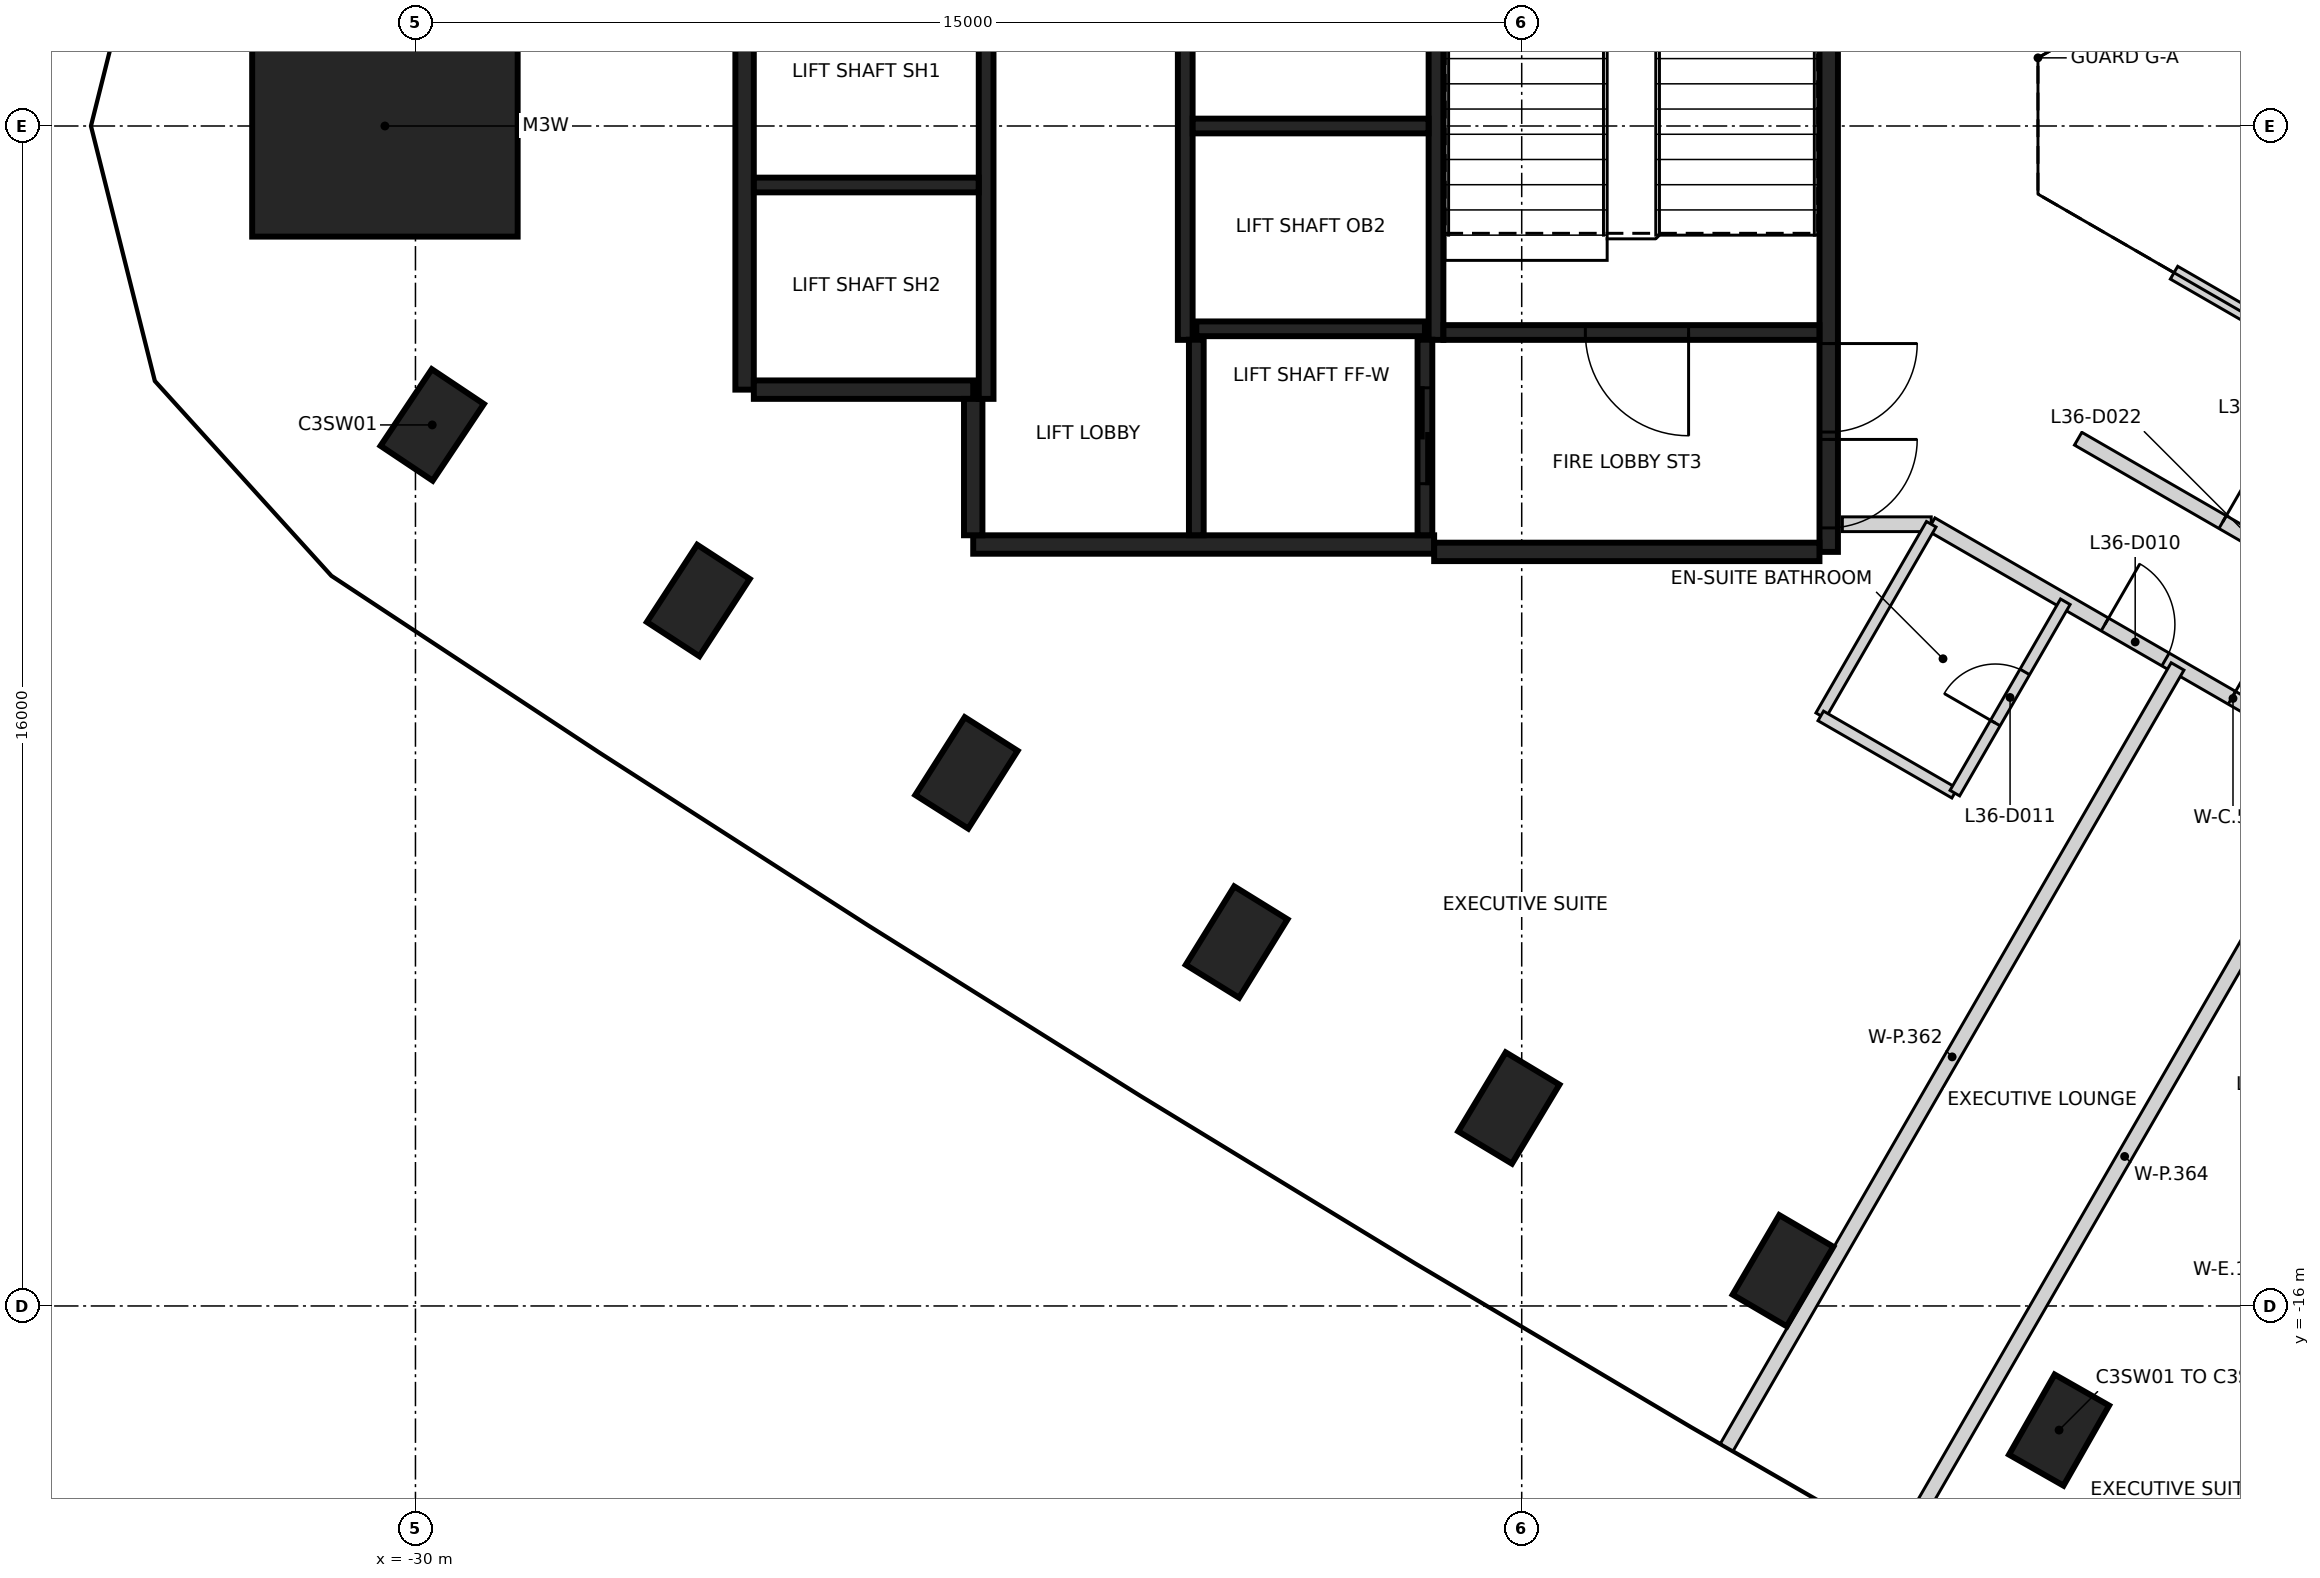
"""IFC4 building model, lengths in metres.
Left out: names, types, materials, properties, quantities, classifications, styles, units other than length and angle.
Written with IfcOpenShell. Run it as: python <this file> out.ifc"""

import sys

from ifc_helpers import new_model, si_unit, direction, frame, frame_2d, origin, origin_2d, place, context, subcontext, project, spatial, rectangle, extrude, element, fill, save


model = new_model("IFC4")
c1 = context("Model", 3, precision=1e-05, world=origin(), true_north=direction((0.0, 1.0)))
c2 = subcontext(c1, "Body", "Model", "MODEL_VIEW")
j1 = project(units=[si_unit("LENGTHUNIT", "METRE"), si_unit("PLANEANGLEUNIT", "RADIAN")], contexts=[c1])
p1 = place(None, origin())
s1 = spatial("IfcSite", under=j1, at=p1, CompositionType="ELEMENT")
p2 = place(p1, origin())
s2 = spatial("IfcBuilding", under=s1, at=p2, CompositionType="ELEMENT")
p3 = place(p2, frame((0.0, 0.0, 146.8)))
s3 = spatial("IfcBuildingStorey", under=s2, at=p3, CompositionType="ELEMENT", Elevation=146.8)
for number, where, z_axis, x_axis in (
    (1, (-29.773, -4.053, -0.4), (0.0, 0.0, 1.0), (0.556, 0.831, 0.0)),
    (2, (-26.165, -6.434, -0.4), (0.0, 0.0, 1.0), (0.546, 0.838, 0.0)),
    (3, (-22.529, -8.772, -0.4), (0.0, 0.0, 1.0), (0.536, 0.844, 0.0)),
    (4, (-18.865, -11.066, -0.4), (0.0, 0.0, 1.0), (0.526, 0.851, 0.0)),
    (5, (-15.175, -13.316, -0.4), (0.0, 0.0, 1.0), (0.515, 0.857, 0.0)),
    (6, (-11.457, -15.522, -0.4), (0.0, 0.0, 1.0), (0.505, 0.863, 0.0)),
    (7, (-7.714, -17.683, -0.4), (0.0, 0.0, 1.0), (0.495, 0.869, 0.0)),
):
    element("IfcColumn", number, at=place(p3, frame(where, z_axis=z_axis, x_axis=x_axis)), inside=s3, PredefinedType="COLUMN", context=c2, shape_type="SweptSolid", body=[
        extrude(rectangle(XDim=1.25, YDim=0.85, at=origin_2d()), origin(), (0.0, 0.0, 1.0), 3.6),
    ])
p4 = place(p3, frame((-30.414, 0.0, -0.4), z_axis=(0.0, 0.0, 1.0), x_axis=(1.0, 0.0, 0.0)))
e8 = element("IfcColumn", 8, at=p4, inside=s3, PredefinedType="COLUMN", context=c2, shape_type="SweptSolid", body=[
    extrude(rectangle(XDim=3.6, YDim=3.0, at=origin_2d()), origin(), (0.0, 0.0, 1.0), 3.6),
])
p5 = place(p3, frame((-10.837, 5.775, 0.0), z_axis=(0.0, 0.0, 1.0), x_axis=(0.0, -1.0, 0.0)))
e9 = element("IfcWall", 9, at=p5, inside=s3, PredefinedType="SHEAR", context=c2, shape_type="SweptSolid", body=[
    extrude(rectangle(XDim=11.55, YDim=0.25, at=frame_2d((5.775, 0.0))), origin(), (0.0, 0.0, 1.0), 3.2),
])
p6 = place(p5, frame((10.025, 0.0, 0.0)))
e10 = element("IfcOpeningElement", 10, at=p6, cuts=e9, PredefinedType="OPENING", context=c2, shape_type="SweptSolid", body=[
    extrude(rectangle(XDim=1.2, YDim=2.1, at=frame_2d((0.6, 1.05))), frame((0.0, 0.135, 0.0), z_axis=(0.0, -1.0, 0.0), x_axis=(1.0, 0.0, 0.0)), (0.0, 0.0, 1.0), 0.27),
])
p7 = place(p5, frame((8.725, 0.0, 0.0)))
e11 = element("IfcOpeningElement", 11, at=p7, cuts=e9, PredefinedType="OPENING", context=c2, shape_type="SweptSolid", body=[
    extrude(rectangle(XDim=1.2, YDim=2.1, at=frame_2d((0.6, 1.05))), frame((0.0, 0.135, 0.0), z_axis=(0.0, -1.0, 0.0), x_axis=(1.0, 0.0, 0.0)), (0.0, 0.0, 1.0), 0.27),
])
p8 = place(p3, frame((-16.187, -5.675, 0.0), z_axis=(0.0, 0.0, 1.0), x_axis=(-1.0, 0.0, 0.0)))
e12 = element("IfcWall", 12, at=p8, inside=s3, PredefinedType="SHEAR", context=c2, shape_type="SweptSolid", body=[
    extrude(rectangle(XDim=6.25, YDim=0.25, at=frame_2d((3.125, 0.0))), origin(), (0.0, 0.0, 1.0), 3.2),
])
p9 = place(p3, frame((-25.537, -3.575, 0.0), z_axis=(0.0, 0.0, 1.0), x_axis=(0.0, 1.0, 0.0)))
e13 = element("IfcWall", 13, at=p9, inside=s3, PredefinedType="SHEAR", context=c2, shape_type="SweptSolid", body=[
    extrude(rectangle(XDim=5.85, YDim=0.25, at=frame_2d((2.925, 0.0))), origin(), (0.0, 0.0, 1.0), 3.2),
])
p10 = place(p3, frame((-10.963, -5.775, 0.0), z_axis=(0.0, 0.0, 1.0), x_axis=(-1.0, 0.0, 0.0)))
e14 = element("IfcWall", 14, at=p10, inside=s3, PredefinedType="SHEAR", context=c2, shape_type="SweptSolid", body=[
    extrude(rectangle(XDim=5.225, YDim=0.25, at=frame_2d((2.612, 0.0))), origin(), (0.0, 0.0, 1.0), 3.2),
])
p11 = place(p3, frame((-22.437, -3.575, 0.0), z_axis=(0.0, 0.0, 1.0), x_axis=(-1.0, 0.0, 0.0)))
e15 = element("IfcWall", 15, at=p11, inside=s3, PredefinedType="SHEAR", context=c2, shape_type="SweptSolid", body=[
    extrude(rectangle(XDim=2.975, YDim=0.25, at=frame_2d((1.487, 0.0))), origin(), (0.0, 0.0, 1.0), 3.2),
])
p12 = place(p3, frame((-22.437, -5.55, 0.0), z_axis=(0.0, 0.0, 1.0), x_axis=(0.0, 1.0, 0.0)))
e16 = element("IfcWall", 16, at=p12, inside=s3, PredefinedType="SHEAR", context=c2, shape_type="SweptSolid", body=[
    extrude(rectangle(XDim=1.849, YDim=0.25, at=frame_2d((0.925, 0.0))), origin(), (0.0, 0.0, 1.0), 3.2),
])
p13 = place(p3, frame((-16.162, 2.951, 0.0), z_axis=(0.0, 0.0, 1.0), x_axis=(0.0, -1.0, 0.0)))
e17 = element("IfcWall", 17, at=p13, inside=s3, PredefinedType="SHEAR", context=c2, shape_type="SweptSolid", body=[
    extrude(rectangle(XDim=5.851, YDim=0.2, at=frame_2d((2.925, 0.0))), origin(), (0.0, 0.0, 1.0), 3.2),
])
for number, where, z_axis, x_axis in (
    (18, (-19.562, -2.9, 0.0), (0.0, 0.0, 1.0), (0.0, 1.0, 0.0)),
    (19, (-22.262, 2.4, 0.0), (0.0, 0.0, 1.0), (0.0, -1.0, 0.0)),
):
    element("IfcWall", number, at=place(p3, frame(where, z_axis=z_axis, x_axis=x_axis)), inside=s3, PredefinedType="SHEAR", context=c2, shape_type="SweptSolid", body=[
        extrude(rectangle(XDim=6.1, YDim=0.2, at=frame_2d((3.05, 0.0))), origin(), (0.0, 0.0, 1.0), 3.2),
    ])
p14 = place(p3, frame((-10.963, -2.8, 0.0), z_axis=(0.0, 0.0, 1.0), x_axis=(-1.0, 0.0, 0.0)))
e20 = element("IfcWall", 20, at=p14, inside=s3, PredefinedType="SHEAR", context=c2, shape_type="SweptSolid", body=[
    extrude(rectangle(XDim=5.098, YDim=0.2, at=frame_2d((2.549, 0.0))), origin(), (0.0, 0.0, 1.0), 3.2),
])
p15 = place(p14, frame((1.774, 0.0, 0.0)))
e21 = element("IfcOpeningElement", 21, at=p15, cuts=e20, PredefinedType="OPENING", context=c2, shape_type="SweptSolid", body=[
    extrude(rectangle(XDim=1.4, YDim=2.1, at=frame_2d((0.7, 1.05))), frame((0.0, 0.11, 0.0), z_axis=(0.0, -1.0, 0.0), x_axis=(1.0, 0.0, 0.0)), (0.0, 0.0, 1.0), 0.22),
])
p16 = place(p3, frame((-16.263, 0.0, 0.0), z_axis=(0.0, 0.0, 1.0), x_axis=(-1.0, 0.0, 0.0)))
e22 = element("IfcWall", 22, at=p16, inside=s3, PredefinedType="SHEAR", context=c2, shape_type="SweptSolid", body=[
    extrude(rectangle(XDim=3.198, YDim=0.2, at=frame_2d((1.599, 0.0))), origin(), (0.0, 0.0, 1.0), 3.2),
])
p17 = place(p3, frame((-22.363, -0.8, 0.0), z_axis=(0.0, 0.0, 1.0), x_axis=(-1.0, 0.0, 0.0)))
e23 = element("IfcWall", 23, at=p17, inside=s3, PredefinedType="SHEAR", context=c2, shape_type="SweptSolid", body=[
    extrude(rectangle(XDim=3.048, YDim=0.2, at=frame_2d((1.524, 0.0))), origin(), (0.0, 0.0, 1.0), 3.2),
])
p18 = place(p3, frame((-19.412, -2.75, 0.0), z_axis=(0.0, 0.0, 1.0), x_axis=(1.0, 0.0, 0.0)))
e24 = element("IfcWall", 24, at=p18, inside=s3, PredefinedType="SHEAR", context=c2, shape_type="SweptSolid", body=[
    extrude(rectangle(XDim=3.1, YDim=0.2, at=frame_2d((1.55, 0.0))), origin(), (0.0, 0.0, 1.0), 3.2),
])
p19 = place(p3, frame((-16.312, -2.898, 0.0), z_axis=(0.0, 0.0, 1.0), x_axis=(0.0, -1.0, 0.0)))
e25 = element("IfcWall", 25, at=p19, inside=s3, PredefinedType="SHEAR", context=c2, shape_type="SweptSolid", body=[
    extrude(rectangle(XDim=2.651, YDim=0.2, at=frame_2d((1.325, 0.0))), origin(), (0.0, 0.0, 1.0), 3.2),
])
p20 = place(p19, frame((0.652, 0.0, 0.0)))
e26 = element("IfcOpeningElement", 26, at=p20, cuts=e25, PredefinedType="OPENING", context=c2, shape_type="SweptSolid", body=[
    extrude(rectangle(XDim=1.3, YDim=2.1, at=frame_2d((0.65, 1.05))), frame((0.0, 0.11, 0.0), z_axis=(0.0, -1.0, 0.0), x_axis=(1.0, 0.0, 0.0)), (0.0, 0.0, 1.0), 0.22),
])
p21 = place(p3, frame((-19.412, -5.549, 0.0), z_axis=(0.0, 0.0, 1.0), x_axis=(0.0, 1.0, 0.0)))
e27 = element("IfcWall", 27, at=p21, inside=s3, PredefinedType="SHEAR", context=c2, shape_type="SweptSolid", body=[
    extrude(rectangle(XDim=2.651, YDim=0.2, at=frame_2d((1.325, 0.0))), origin(), (0.0, 0.0, 1.0), 3.2),
])
p22 = place(p3, frame((-10.652, -5.4, 0.0), z_axis=(0.0, 0.0, 1.0), x_axis=(1.0, 0.0, 0.0)))
e28 = element("IfcWall", 28, at=p22, inside=s3, PredefinedType="PARTITIONING", context=c2, shape_type="SweptSolid", body=[
    extrude(rectangle(XDim=1.205, YDim=0.2, at=frame_2d((0.603, 0.0))), origin(), (0.0, 0.0, 1.0), 3.2),
])
p23 = place(p3, frame((-9.447, -5.4, 0.0), z_axis=(0.0, 0.0, 1.0), x_axis=(0.866101262146, -0.49986858644, 0.0)))
e29 = element("IfcWall", 29, at=p23, inside=s3, PredefinedType="PARTITIONING", context=c2, shape_type="SweptSolid", body=[
    extrude(rectangle(XDim=9.449, YDim=0.2, at=frame_2d((4.724, 0.0))), origin(), (0.0, 0.0, 1.0), 3.2),
])
p24 = place(p23, frame((2.718, 0.0, 0.0)))
e30 = element("IfcOpeningElement", 30, at=p24, cuts=e29, PredefinedType="OPENING", context=c2, shape_type="SweptSolid", body=[
    extrude(rectangle(XDim=0.95, YDim=2.1, at=frame_2d((0.475, 1.05))), frame((0.0, 0.11, 0.0), z_axis=(0.0, -1.0, 0.0), x_axis=(1.0, 0.0, 0.0)), (0.0, 0.0, 1.0), 0.22),
])
p25 = place(p23, frame((4.707, 0.0, 0.0)))
e31 = element("IfcOpeningElement", 31, at=p25, cuts=e29, PredefinedType="OPENING", context=c2, shape_type="SweptSolid", body=[
    extrude(rectangle(XDim=1.0, YDim=2.1, at=frame_2d((0.5, 1.05))), frame((0.0, 0.11, 0.0), z_axis=(0.0, -1.0, 0.0), x_axis=(1.0, 0.0, 0.0)), (0.0, 0.0, 1.0), 0.22),
])
p26 = place(p23, frame((6.746, 0.0, 0.0)))
e32 = element("IfcOpeningElement", 32, at=p26, cuts=e29, PredefinedType="OPENING", context=c2, shape_type="SweptSolid", body=[
    extrude(rectangle(XDim=0.95, YDim=2.1, at=frame_2d((0.475, 1.05))), frame((0.0, 0.11, 0.0), z_axis=(0.0, -1.0, 0.0), x_axis=(1.0, 0.0, 0.0)), (0.0, 0.0, 1.0), 0.22),
])
p27 = place(p3, frame((-7.455, -4.24, 0.0), z_axis=(0.0, 0.0, 1.0), x_axis=(0.866015783746, -0.500016662025, 0.0)))
e33 = element("IfcWall", 33, at=p27, inside=s3, PredefinedType="PARTITIONING", context=c2, shape_type="SweptSolid", body=[
    extrude(rectangle(XDim=10.009, YDim=0.2, at=frame_2d((5.004, 0.0))), origin(), (0.0, 0.0, 1.0), 3.2),
])
p28 = place(p27, frame((2.262, 0.0, 0.0)))
e34 = element("IfcOpeningElement", 34, at=p28, cuts=e33, PredefinedType="OPENING", context=c2, shape_type="SweptSolid", body=[
    extrude(rectangle(XDim=0.9, YDim=2.1, at=frame_2d((0.45, 1.05))), frame((0.0, 0.11, 0.0), z_axis=(0.0, -1.0, 0.0), x_axis=(1.0, 0.0, 0.0)), (0.0, 0.0, 1.0), 0.22),
])
p29 = place(p27, frame((7.254, 0.0, 0.0)))
e35 = element("IfcOpeningElement", 35, at=p29, cuts=e33, PredefinedType="OPENING", context=c2, shape_type="SweptSolid", body=[
    extrude(rectangle(XDim=0.9, YDim=2.1, at=frame_2d((0.45, 1.05))), frame((0.0, 0.11, 0.0), z_axis=(0.0, -1.0, 0.0), x_axis=(1.0, 0.0, 0.0)), (0.0, 0.0, 1.0), 0.22),
])
p30 = place(p3, frame((-12.22, -17.917, 0.0), z_axis=(0.0, 0.0, 1.0), x_axis=(0.499963860175, 0.866046268117, 0.0)))
e36 = element("IfcWall", 36, at=p30, inside=s3, PredefinedType="PARTITIONING", context=c2, shape_type="SweptSolid", body=[
    extrude(rectangle(XDim=12.227, YDim=0.2, at=frame_2d((6.114, 0.0))), origin(), (0.0, 0.0, 1.0), 2.3),
])
p31 = place(p3, frame((-9.882, -19.267, 0.0), z_axis=(0.0, 0.0, 1.0), x_axis=(0.499993811829, 0.866028976497, 0.0)))
e37 = element("IfcWall", 37, at=p31, inside=s3, PredefinedType="PARTITIONING", context=c2, shape_type="SweptSolid", body=[
    extrude(rectangle(XDim=12.227, YDim=0.2, at=frame_2d((6.114, 0.0))), origin(), (0.0, 0.0, 1.0), 2.3),
])
p32 = place(p3, frame((-6.155, -1.989, 0.0), z_axis=(0.0, 0.0, 1.0), x_axis=(0.866009062299, -0.500028303215, 0.0)))
e38 = element("IfcWall", 38, at=p32, inside=s3, PredefinedType="PARTITIONING", context=c2, shape_type="SweptSolid", body=[
    extrude(rectangle(XDim=10.802, YDim=0.2, at=frame_2d((5.401, 0.0))), origin(), (0.0, 0.0, 1.0), 2.3),
])
p33 = place(p3, frame((-5.173, -21.926, 0.0), z_axis=(0.0, 0.0, 1.0), x_axis=(0.499941227542, 0.86605933342, 0.0)))
e39 = element("IfcWall", 39, at=p33, inside=s3, PredefinedType="PARTITIONING", context=c2, shape_type="SweptSolid", body=[
    extrude(rectangle(XDim=5.249, YDim=0.2, at=frame_2d((2.625, 0.0))), origin(), (0.0, 0.0, 1.0), 3.2),
])
p34 = place(p3, frame((-10.946, -7.996, 0.0), z_axis=(0.0, 0.0, 1.0), x_axis=(0.500027927039, 0.866009279501, 0.0)))
e40 = element("IfcWall", 40, at=p34, inside=s3, PredefinedType="PARTITIONING", context=c2, shape_type="SweptSolid", body=[
    extrude(rectangle(XDim=2.998, YDim=0.15, at=frame_2d((1.499, 0.0))), origin(), (0.0, 0.0, 1.0), 3.2),
])
p35 = place(p3, frame((-10.945, -7.999, 0.0), z_axis=(0.0, 0.0, 1.0), x_axis=(0.866005190944, -0.500035008033, 0.0)))
e41 = element("IfcWall", 41, at=p35, inside=s3, PredefinedType="PARTITIONING", context=c2, shape_type="SweptSolid", body=[
    extrude(rectangle(XDim=2.096, YDim=0.15, at=frame_2d((1.048, 0.0))), origin(), (0.0, 0.0, 1.0), 3.2),
])
p36 = place(p3, frame((-9.127, -9.046, 0.0), z_axis=(0.0, 0.0, 1.0), x_axis=(0.499959910729, 0.866048548099, 0.0)))
e42 = element("IfcWall", 42, at=p36, inside=s3, PredefinedType="PARTITIONING", context=c2, shape_type="SweptSolid", body=[
    extrude(rectangle(XDim=2.996, YDim=0.15, at=frame_2d((1.498, 0.0))), origin(), (0.0, 0.0, 1.0), 3.2),
])
p37 = place(p36, frame((1.098, 0.0, 0.0)))
e43 = element("IfcOpeningElement", 43, at=p37, cuts=e42, PredefinedType="OPENING", context=c2, shape_type="SweptSolid", body=[
    extrude(rectangle(XDim=0.8, YDim=2.1, at=frame_2d((0.4, 1.05))), frame((0.0, 0.085, 0.0), z_axis=(0.0, -1.0, 0.0), x_axis=(1.0, 0.0, 0.0)), (0.0, 0.0, 1.0), 0.17),
])
p38 = place(p20, origin())
e44 = element("IfcDoor", 44, at=p38, inside=s3, OperationType="SLIDING_TO_RIGHT", PredefinedType="DOOR", context=c2, shape_type="SweptSolid", body=[
    extrude(rectangle(XDim=1.3, YDim=2.1, at=frame_2d((0.65, 1.05))), frame((0.0, 0.025, 0.0), z_axis=(0.0, -1.0, 0.0), x_axis=(1.0, 0.0, 0.0)), (0.0, 0.0, 1.0), 0.05),
])
fill(e26, e44)
p39 = place(p6, origin())
e45 = element("IfcDoor", 45, at=p39, inside=s3, OperationType="SINGLE_SWING_LEFT", PredefinedType="DOOR", context=c2, shape_type="SweptSolid", body=[
    extrude(rectangle(XDim=1.2, YDim=2.1, at=frame_2d((0.6, 1.05))), frame((0.0, 0.025, 0.0), z_axis=(0.0, -1.0, 0.0), x_axis=(1.0, 0.0, 0.0)), (0.0, 0.0, 1.0), 0.05),
])
fill(e10, e45)
p40 = place(p7, origin())
e46 = element("IfcDoor", 46, at=p40, inside=s3, OperationType="SINGLE_SWING_RIGHT", PredefinedType="DOOR", context=c2, shape_type="SweptSolid", body=[
    extrude(rectangle(XDim=1.2, YDim=2.1, at=frame_2d((0.6, 1.05))), frame((0.0, 0.025, 0.0), z_axis=(0.0, -1.0, 0.0), x_axis=(1.0, 0.0, 0.0)), (0.0, 0.0, 1.0), 0.05),
])
fill(e11, e46)
p41 = place(p15, origin())
e47 = element("IfcDoor", 47, at=p41, inside=s3, OperationType="SINGLE_SWING_RIGHT", PredefinedType="DOOR", context=c2, shape_type="SweptSolid", body=[
    extrude(rectangle(XDim=1.4, YDim=2.1, at=frame_2d((0.7, 1.05))), frame((0.0, 0.025, 0.0), z_axis=(0.0, -1.0, 0.0), x_axis=(1.0, 0.0, 0.0)), (0.0, 0.0, 1.0), 0.05),
])
fill(e21, e47)
p42 = place(p24, frame((0.95, 0.0, 0.0), z_axis=(0.0, 0.0, 1.0), x_axis=(-1.0, 0.0, 0.0)))
e48 = element("IfcDoor", 48, at=p42, inside=s3, OperationType="SINGLE_SWING_LEFT", PredefinedType="DOOR", context=c2, shape_type="SweptSolid", body=[
    extrude(rectangle(XDim=0.95, YDim=2.1, at=frame_2d((0.475, 1.05))), frame((0.0, 0.025, 0.0), z_axis=(0.0, -1.0, 0.0), x_axis=(1.0, 0.0, 0.0)), (0.0, 0.0, 1.0), 0.05),
])
fill(e30, e48)
p43 = place(p37, origin())
e49 = element("IfcDoor", 49, at=p43, inside=s3, OperationType="SINGLE_SWING_LEFT", PredefinedType="DOOR", context=c2, shape_type="SweptSolid", body=[
    extrude(rectangle(XDim=0.8, YDim=2.1, at=frame_2d((0.4, 1.05))), frame((0.0, 0.025, 0.0), z_axis=(0.0, -1.0, 0.0), x_axis=(1.0, 0.0, 0.0)), (0.0, 0.0, 1.0), 0.05),
])
fill(e43, e49)
p44 = place(p25, frame((1.0, 0.0, 0.0), z_axis=(0.0, 0.0, 1.0), x_axis=(-1.0, 0.0, 0.0)))
e50 = element("IfcDoor", 50, at=p44, inside=s3, OperationType="SINGLE_SWING_LEFT", PredefinedType="DOOR", context=c2, shape_type="SweptSolid", body=[
    extrude(rectangle(XDim=1.0, YDim=2.1, at=frame_2d((0.5, 1.05))), frame((0.0, 0.025, 0.0), z_axis=(0.0, -1.0, 0.0), x_axis=(1.0, 0.0, 0.0)), (0.0, 0.0, 1.0), 0.05),
])
fill(e31, e50)
p45 = place(p28, origin())
e51 = element("IfcDoor", 51, at=p45, inside=s3, OperationType="SINGLE_SWING_LEFT", PredefinedType="DOOR", context=c2, shape_type="SweptSolid", body=[
    extrude(rectangle(XDim=0.9, YDim=2.1, at=frame_2d((0.45, 1.05))), frame((0.0, 0.025, 0.0), z_axis=(0.0, -1.0, 0.0), x_axis=(1.0, 0.0, 0.0)), (0.0, 0.0, 1.0), 0.05),
])
fill(e34, e51)
save(model, sys.argv[1])
